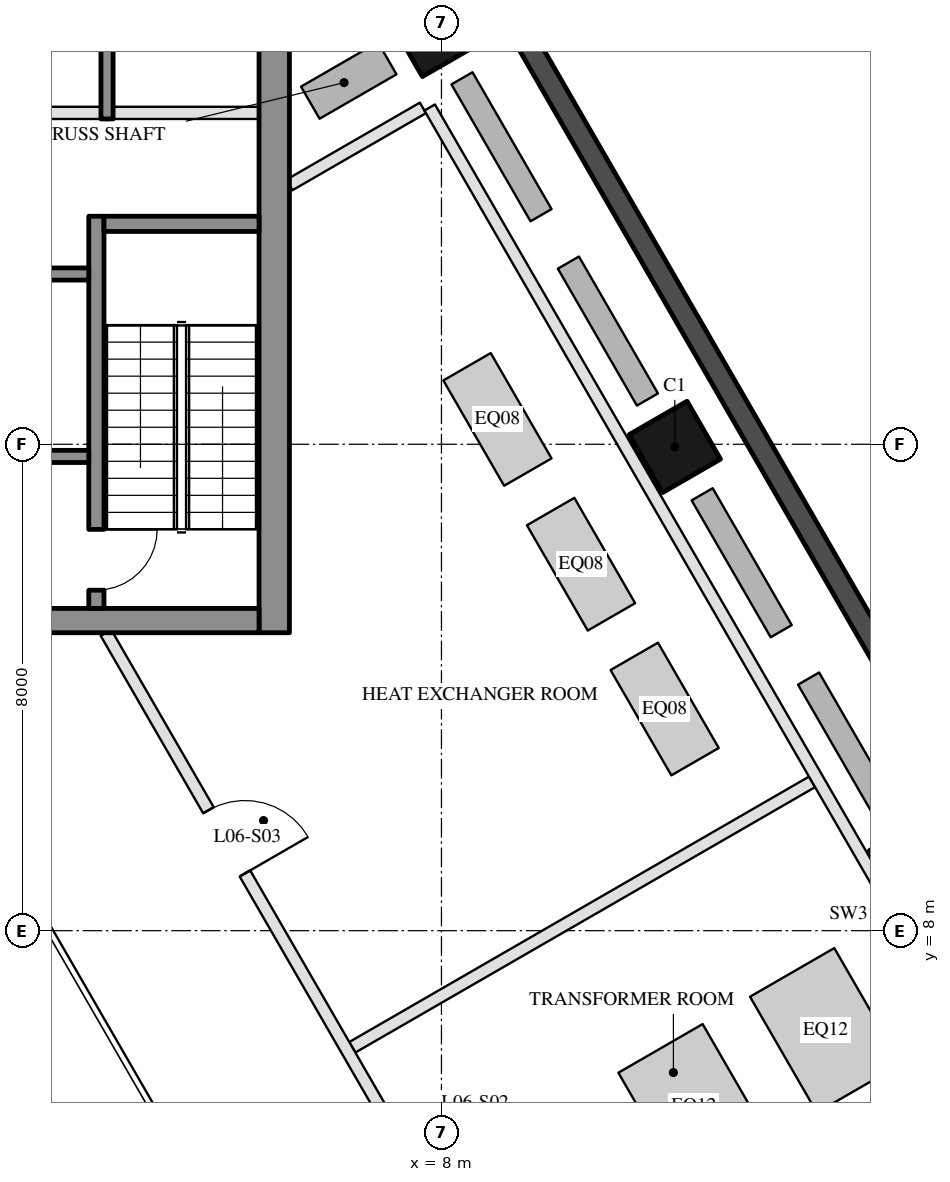
"""IFC4 building model, lengths in metres.
Left out: names, types, materials, properties, quantities, classifications, styles, units other than length and angle.
Written with IfcOpenShell. Run it as: python <this file> out.ifc"""

import sys

from ifc_helpers import new_model, si_unit, direction, frame, frame_2d, origin, origin_2d, place, context, subcontext, project, spatial, rectangle, hollow_rectangle, extrude, boolean, halfspace, element, fill, save


model = new_model("IFC4")
c1 = context("Model", 3, precision=1e-05, world=origin(), true_north=direction((0.0, 1.0)))
c2 = subcontext(c1, "Body", "Model", "MODEL_VIEW")
j1 = project(units=[si_unit("LENGTHUNIT", "METRE"), si_unit("PLANEANGLEUNIT", "RADIAN")], contexts=[c1])
p1 = place(None, origin())
s1 = spatial("IfcSite", under=j1, at=p1, CompositionType="ELEMENT")
p2 = place(p1, origin())
s2 = spatial("IfcBuilding", under=s1, at=p2, CompositionType="ELEMENT")
p3 = place(p2, frame((0.0, 0.0, 37.5)))
s3 = spatial("IfcBuildingStorey", under=s2, at=p3, CompositionType="ELEMENT", Elevation=37.5)
p4 = place(p3, frame((15.788, 9.115, 0.0), z_axis=(0.0, 0.0, 1.0), x_axis=(-0.5, 0.866025403784, 0.0)))
e1 = element("IfcColumn", 1, at=p4, inside=s3, PredefinedType="COLUMN", context=c2, shape_type="SweptSolid", body=[
    boolean("DIFFERENCE", extrude(hollow_rectangle(XDim=1.1, YDim=1.1, WallThickness=0.05, at=origin_2d()), origin(), (0.0, 0.0, 1.0), 4.5), halfspace(frame((0.0, 0.0, 0.006), z_axis=(0.0, 0.0, 1.0), x_axis=(1.0, 0.0, 0.0)), True)),
])
p5 = place(p3, frame((11.838, 15.957, 0.0), z_axis=(0.0, 0.0, 1.0), x_axis=(-0.5, 0.866025403784, 0.0)))
e2 = element("IfcColumn", 2, at=p5, inside=s3, PredefinedType="COLUMN", context=c2, shape_type="SweptSolid", body=[
    boolean("DIFFERENCE", extrude(hollow_rectangle(XDim=1.1, YDim=1.1, WallThickness=0.05, at=origin_2d()), origin(), (0.0, 0.0, 1.0), 4.5), halfspace(frame((0.0, 0.0, 0.006), z_axis=(0.0, 0.0, 1.0), x_axis=(1.0, 0.0, 0.0)), True)),
])
p6 = place(p3, frame((7.888, 22.798, 0.0), z_axis=(0.0, 0.0, 1.0), x_axis=(-0.5, 0.866025403784, 0.0)))
e3 = element("IfcColumn", 3, at=p6, inside=s3, PredefinedType="COLUMN", context=c2, shape_type="SweptSolid", body=[
    boolean("DIFFERENCE", extrude(hollow_rectangle(XDim=1.1, YDim=1.1, WallThickness=0.05, at=origin_2d()), origin(), (0.0, 0.0, 1.0), 4.5), halfspace(frame((0.0, 0.0, 0.007), z_axis=(0.0, 0.0, 1.0), x_axis=(1.0, 0.0, 0.0)), True)),
])
p7 = place(p3, frame((26.256, -6.567, 0.0), z_axis=(0.0, 0.0, 1.0), x_axis=(-0.499998380999, 0.866026338513, 0.0)))
e4 = element("IfcWall", 4, at=p7, inside=s3, PredefinedType="SOLIDWALL", context=c2, shape_type="SweptSolid", body=[
    extrude(rectangle(XDim=37.631, YDim=0.35, at=frame_2d((18.816, 0.0))), origin(), (0.0, 0.0, 1.0), 4.2),
])
p8 = place(p3, frame((5.25, 12.9, 0.0), z_axis=(0.0, 0.0, 1.0), x_axis=(0.0, 1.0, 0.0)))
e5 = element("IfcWall", 5, at=p8, inside=s3, PredefinedType="SHEAR", context=c2, shape_type="SweptSolid", body=[
    extrude(rectangle(XDim=14.837, YDim=0.5, at=frame_2d((7.418, 0.0))), origin(), (0.0, 0.0, 1.0), 4.2),
])
p9 = place(p3, frame((5.0, 13.1, 0.0), z_axis=(0.0, 0.0, 1.0), x_axis=(-1.0, 0.0, 0.0)))
e6 = element("IfcWall", 6, at=p9, inside=s3, PredefinedType="SHEAR", context=c2, shape_type="SweptSolid", body=[
    extrude(rectangle(XDim=10.0, YDim=0.4, at=frame_2d((5.0, 0.0))), origin(), (0.0, 0.0, 1.0), 4.2),
])
p10 = place(p9, frame((3.55, 0.0, 0.0)))
e7 = element("IfcOpeningElement", 7, at=p10, cuts=e6, PredefinedType="OPENING", context=c2, shape_type="SweptSolid", body=[
    extrude(rectangle(XDim=1.1, YDim=2.1, at=frame_2d((0.55, 1.05))), frame((0.0, 0.21, 0.0), z_axis=(0.0, -1.0, 0.0), x_axis=(1.0, 0.0, 0.0)), (0.0, 0.0, 1.0), 0.42),
])
p11 = place(p9, frame((5.85, 0.0, 0.0)))
e8 = element("IfcOpeningElement", 8, at=p11, cuts=e6, PredefinedType="OPENING", context=c2, shape_type="SweptSolid", body=[
    extrude(rectangle(XDim=1.4, YDim=2.1, at=frame_2d((0.7, 1.05))), frame((0.0, 0.21, 0.0), z_axis=(0.0, -1.0, 0.0), x_axis=(1.0, 0.0, 0.0)), (0.0, 0.0, 1.0), 0.42),
])
p12 = place(p3, frame((2.325, 13.3, 0.0), z_axis=(0.0, 0.0, 1.0), x_axis=(0.0, 1.0, 0.0)))
e9 = element("IfcWall", 9, at=p12, inside=s3, PredefinedType="SHEAR", context=c2, shape_type="SweptSolid", body=[
    extrude(rectangle(XDim=6.45, YDim=0.25, at=frame_2d((3.225, 0.0))), origin(), (0.0, 0.0, 1.0), 4.2),
])
p13 = place(p12, frame((0.3, 0.0, 0.0)))
e10 = element("IfcOpeningElement", 10, at=p13, cuts=e9, PredefinedType="OPENING", context=c2, shape_type="SweptSolid", body=[
    extrude(rectangle(XDim=1.0, YDim=2.1, at=frame_2d((0.5, 1.05))), frame((0.0, 0.135, 0.0), z_axis=(0.0, -1.0, 0.0), x_axis=(1.0, 0.0, 0.0)), (0.0, 0.0, 1.0), 0.27),
])
p14 = place(p3, frame((5.0, 19.625, 0.0), z_axis=(0.0, 0.0, 1.0), x_axis=(-1.0, 0.0, 0.0)))
e11 = element("IfcWall", 11, at=p14, inside=s3, PredefinedType="SHEAR", context=c2, shape_type="SweptSolid", body=[
    extrude(rectangle(XDim=2.55, YDim=0.25, at=frame_2d((1.275, 0.0))), origin(), (0.0, 0.0, 1.0), 4.2),
])
p15 = place(p3, frame((2.2, 18.8, 0.0), z_axis=(0.0, 0.0, 1.0), x_axis=(-1.0, 0.0, 0.0)))
e12 = element("IfcWall", 12, at=p15, inside=s3, PredefinedType="SHEAR", context=c2, shape_type="SweptSolid", body=[
    extrude(rectangle(XDim=2.8, YDim=0.2, at=frame_2d((1.4, 0.0))), origin(), (0.0, 0.0, 1.0), 4.2),
])
p16 = place(p3, frame((2.2, 15.8, 0.0), z_axis=(0.0, 0.0, 1.0), x_axis=(-1.0, 0.0, 0.0)))
e13 = element("IfcWall", 13, at=p16, inside=s3, PredefinedType="SHEAR", context=c2, shape_type="SweptSolid", body=[
    extrude(rectangle(XDim=2.8, YDim=0.2, at=frame_2d((1.4, 0.0))), origin(), (0.0, 0.0, 1.0), 4.2),
])
p17 = place(p16, frame((0.7, 0.0, 0.0)))
e14 = element("IfcOpeningElement", 14, at=p17, cuts=e13, PredefinedType="OPENING", context=c2, shape_type="SweptSolid", body=[
    extrude(rectangle(XDim=1.2, YDim=2.1, at=frame_2d((0.6, 1.05))), frame((0.0, 0.11, 0.0), z_axis=(0.0, -1.0, 0.0), x_axis=(1.0, 0.0, 0.0)), (0.0, 0.0, 1.0), 0.22),
])
p18 = place(p3, frame((2.5, 21.35, 0.0), z_axis=(0.0, 0.0, 1.0), x_axis=(0.0, 1.0, 0.0)))
e15 = element("IfcWall", 15, at=p18, inside=s3, PredefinedType="SHEAR", context=c2, shape_type="SweptSolid", body=[
    extrude(rectangle(XDim=2.8, YDim=0.2, at=frame_2d((1.4, 0.0))), origin(), (0.0, 0.0, 1.0), 4.2),
])
p19 = place(p3, frame((5.0, 21.45, 0.0), z_axis=(0.0, 0.0, 1.0), x_axis=(-1.0, 0.0, 0.0)))
e16 = element("IfcWall", 16, at=p19, inside=s3, PredefinedType="PARTITIONING", context=c2, shape_type="SweptSolid", body=[
    extrude(rectangle(XDim=2.4, YDim=0.2, at=frame_2d((1.2, 0.0))), origin(), (0.0, 0.0, 1.0), 4.2),
])
p20 = place(p3, frame((2.4, 21.45, 0.0), z_axis=(0.0, 0.0, 1.0), x_axis=(-1.0, 0.0, 0.0)))
e17 = element("IfcWall", 17, at=p20, inside=s3, PredefinedType="PARTITIONING", context=c2, shape_type="SweptSolid", body=[
    extrude(rectangle(XDim=2.8, YDim=0.2, at=frame_2d((1.4, 0.0))), origin(), (0.0, 0.0, 1.0), 4.2),
])
p21 = place(p3, frame((17.095, 5.251, 0.0), z_axis=(0.0, 0.0, 1.0), x_axis=(-0.866023051915, -0.500004073536, 0.0)))
e18 = element("IfcWall", 18, at=p21, inside=s3, PredefinedType="PARTITIONING", context=c2, shape_type="SweptSolid", body=[
    extrude(rectangle(XDim=8.73, YDim=0.2, at=frame_2d((4.365, 0.0))), origin(), (0.0, 0.0, 1.0), 3.41),
])
p22 = place(p3, frame((14.095, 10.447, 0.0), z_axis=(0.0, 0.0, 1.0), x_axis=(-0.866023051915, -0.500004073536, 0.0)))
e19 = element("IfcWall", 19, at=p22, inside=s3, PredefinedType="PARTITIONING", context=c2, shape_type="SweptSolid", body=[
    extrude(rectangle(XDim=8.73, YDim=0.2, at=frame_2d((4.365, 0.0))), origin(), (0.0, 0.0, 1.0), 4.2),
])
p23 = place(p3, frame((7.695, 21.532, 0.0), z_axis=(0.0, 0.0, 1.0), x_axis=(-0.865999496279, -0.500044870432, 0.0)))
e20 = element("IfcWall", 20, at=p23, inside=s3, PredefinedType="PARTITIONING", context=c2, shape_type="SweptSolid", body=[
    extrude(rectangle(XDim=2.534, YDim=0.2, at=frame_2d((1.267, 0.0))), origin(), (0.0, 0.0, 1.0), 4.2),
])
p24 = place(p3, frame((22.556, -4.009, 0.0), z_axis=(0.0, 0.0, 1.0), x_axis=(-0.500002084189, 0.866024200474, 0.0)))
e21 = element("IfcWall", 21, at=p24, inside=s3, PredefinedType="PARTITIONING", context=c2, shape_type="SweptSolid", body=[
    extrude(rectangle(XDim=29.5, YDim=0.2, at=frame_2d((14.75, 0.0))), origin(), (0.0, 0.0, 1.0), 3.41),
])
p25 = place(p3, frame((12.413, -4.3, 0.0), z_axis=(0.0, 0.0, 1.0), x_axis=(-0.50000478328, 0.866022642139, 0.0)))
e22 = element("IfcWall", 22, at=p25, inside=s3, PredefinedType="PARTITIONING", context=c2, shape_type="SweptSolid", body=[
    extrude(rectangle(XDim=19.861, YDim=0.2, at=frame_2d((9.931, 0.0))), origin(), (0.0, 0.0, 1.0), 3.41),
])
p26 = place(p25, frame((2.371, 0.0, 0.0)))
e23 = element("IfcOpeningElement", 23, at=p26, cuts=e22, PredefinedType="OPENING", context=c2, shape_type="SweptSolid", body=[
    extrude(rectangle(XDim=1.2, YDim=2.1, at=frame_2d((0.6, 1.05))), frame((0.0, 0.11, 0.0), z_axis=(0.0, -1.0, 0.0), x_axis=(1.0, 0.0, 0.0)), (0.0, 0.0, 1.0), 0.22),
])
p27 = place(p25, frame((8.331, 0.0, 0.0)))
e24 = element("IfcOpeningElement", 24, at=p27, cuts=e22, PredefinedType="OPENING", context=c2, shape_type="SweptSolid", body=[
    extrude(rectangle(XDim=1.2, YDim=2.1, at=frame_2d((0.6, 1.05))), frame((0.0, 0.11, 0.0), z_axis=(0.0, -1.0, 0.0), x_axis=(1.0, 0.0, 0.0)), (0.0, 0.0, 1.0), 0.22),
])
p28 = place(p25, frame((15.29, 0.0, 0.0)))
e25 = element("IfcOpeningElement", 25, at=p28, cuts=e22, PredefinedType="OPENING", context=c2, shape_type="SweptSolid", body=[
    extrude(rectangle(XDim=1.2, YDim=2.1, at=frame_2d((0.6, 1.05))), frame((0.0, 0.11, 0.0), z_axis=(0.0, -1.0, 0.0), x_axis=(1.0, 0.0, 0.0)), (0.0, 0.0, 1.0), 0.22),
])
p29 = place(p13, frame((1.0, 0.0, 0.0), z_axis=(0.0, 0.0, 1.0), x_axis=(-1.0, 0.0, 0.0)))
e26 = element("IfcDoor", 26, at=p29, inside=s3, OperationType="SINGLE_SWING_LEFT", PredefinedType="DOOR", context=c2, shape_type="SweptSolid", body=[
    extrude(rectangle(XDim=1.0, YDim=2.1, at=frame_2d((0.5, 1.05))), frame((0.0, 0.025, 0.0), z_axis=(0.0, -1.0, 0.0), x_axis=(1.0, 0.0, 0.0)), (0.0, 0.0, 1.0), 0.05),
])
fill(e10, e26)
p30 = place(p28, frame((1.2, 0.0, 0.0), z_axis=(0.0, 0.0, 1.0), x_axis=(-1.0, 0.0, 0.0)))
e27 = element("IfcDoor", 27, at=p30, inside=s3, OperationType="SINGLE_SWING_RIGHT", PredefinedType="DOOR", context=c2, shape_type="SweptSolid", body=[
    extrude(rectangle(XDim=1.2, YDim=2.1, at=frame_2d((0.6, 1.05))), frame((0.0, 0.025, 0.0), z_axis=(0.0, -1.0, 0.0), x_axis=(1.0, 0.0, 0.0)), (0.0, 0.0, 1.0), 0.05),
])
fill(e25, e27)
save(model, sys.argv[1])
